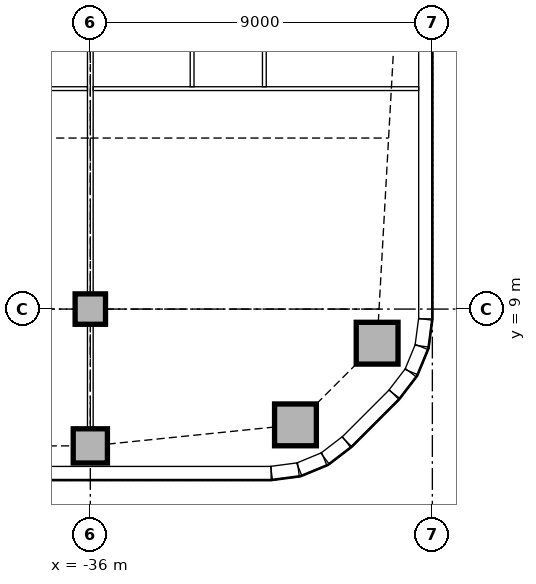
"""IFC4 building model, lengths in metres.
Left out: names, types, materials, properties, quantities, classifications, styles, units other than length and angle.
Written with IfcOpenShell. Run it as: python <this file> out.ifc"""

import sys

from ifc_helpers import new_model, si_unit, direction, frame, frame_2d, origin, origin_2d, place, context, subcontext, project, spatial, rectangle, extrude, element, fill, save


model = new_model("IFC4")
c1 = context("Model", 3, precision=1e-05, world=origin(), true_north=direction((0.0, 1.0)))
c2 = subcontext(c1, "Body", "Model", "MODEL_VIEW")
j1 = project(units=[si_unit("LENGTHUNIT", "METRE"), si_unit("PLANEANGLEUNIT", "RADIAN")], contexts=[c1])
p1 = place(None, origin())
s1 = spatial("IfcSite", under=j1, at=p1, CompositionType="ELEMENT")
p2 = place(p1, origin())
s2 = spatial("IfcBuilding", under=s1, at=p2, CompositionType="ELEMENT")
p3 = place(p2, frame((0.0, 0.0, 26.0)))
s3 = spatial("IfcBuildingStorey", under=s2, at=p3, CompositionType="ELEMENT", Elevation=26.0)
for number, where, z_axis, x_axis in (
    (1, (-30.602, 5.953, 0.0), (0.0, 0.0, 1.0), (1.0, 0.0, 0.0)),
    (2, (-28.453, 8.102, 0.0), (0.0, 0.0, 1.0), (1.0, 0.0, 0.0)),
):
    element("IfcColumn", number, at=place(p3, frame(where, z_axis=z_axis, x_axis=x_axis)), inside=s3, PredefinedType="COLUMN", context=c2, shape_type="SweptSolid", body=[
        extrude(rectangle(XDim=1.1, YDim=1.1, at=origin_2d()), origin(), (0.0, 0.0, 1.0), 3.85),
    ])
p4 = place(p3, frame((-36.0, 5.4, 0.0), z_axis=(0.0, 0.0, 1.0), x_axis=(1.0, 0.0, 0.0)))
e3 = element("IfcColumn", 3, at=p4, inside=s3, PredefinedType="COLUMN", context=c2, shape_type="SweptSolid", body=[
    extrude(rectangle(XDim=0.9, YDim=0.9, at=origin_2d()), origin(), (0.0, 0.0, 1.0), 3.85),
])
p5 = place(p3, frame((-36.0, 9.0, 0.0), z_axis=(0.0, 0.0, 1.0), x_axis=(1.0, 0.0, 0.0)))
e4 = element("IfcColumn", 4, at=p5, inside=s3, PredefinedType="COLUMN", context=c2, shape_type="SweptSolid", body=[
    extrude(rectangle(XDim=0.8, YDim=0.8, at=origin_2d()), origin(), (0.0, 0.0, 1.0), 3.85),
])
p6 = place(p3, frame((-61.757, 4.68, 0.0), z_axis=(0.0, 0.0, 1.0), x_axis=(1.0, 0.0, 0.0)))
e5 = element("IfcWall", 5, at=p6, inside=s3, PredefinedType="STANDARD", context=c2, shape_type="SweptSolid", body=[
    extrude(rectangle(XDim=30.515, YDim=0.36, at=frame_2d((15.257, 0.0))), origin(), (0.0, 0.0, 1.0), 3.85),
])
p7 = place(p6, frame((2.357, 0.0, 0.9)))
e6 = element("IfcOpeningElement", 6, at=p7, cuts=e5, PredefinedType="OPENING", context=c2, shape_type="SweptSolid", body=[
    extrude(rectangle(XDim=3.3, YDim=1.6, at=frame_2d((1.65, 0.8))), frame((0.0, 0.19, 0.0), z_axis=(0.0, -1.0, 0.0), x_axis=(1.0, 0.0, 0.0)), (0.0, 0.0, 1.0), 0.38),
])
p8 = place(p6, frame((6.857, 0.0, 0.9)))
e7 = element("IfcOpeningElement", 7, at=p8, cuts=e5, PredefinedType="OPENING", context=c2, shape_type="SweptSolid", body=[
    extrude(rectangle(XDim=3.3, YDim=1.6, at=frame_2d((1.65, 0.8))), frame((0.0, 0.19, 0.0), z_axis=(0.0, -1.0, 0.0), x_axis=(1.0, 0.0, 0.0)), (0.0, 0.0, 1.0), 0.38),
])
p9 = place(p6, frame((11.357, 0.0, 0.9)))
e8 = element("IfcOpeningElement", 8, at=p9, cuts=e5, PredefinedType="OPENING", context=c2, shape_type="SweptSolid", body=[
    extrude(rectangle(XDim=3.3, YDim=1.6, at=frame_2d((1.65, 0.8))), frame((0.0, 0.19, 0.0), z_axis=(0.0, -1.0, 0.0), x_axis=(1.0, 0.0, 0.0)), (0.0, 0.0, 1.0), 0.38),
])
p10 = place(p6, frame((15.857, 0.0, 0.9)))
e9 = element("IfcOpeningElement", 9, at=p10, cuts=e5, PredefinedType="OPENING", context=c2, shape_type="SweptSolid", body=[
    extrude(rectangle(XDim=3.3, YDim=1.6, at=frame_2d((1.65, 0.8))), frame((0.0, 0.19, 0.0), z_axis=(0.0, -1.0, 0.0), x_axis=(1.0, 0.0, 0.0)), (0.0, 0.0, 1.0), 0.38),
])
p11 = place(p6, frame((20.357, 0.0, 0.9)))
e10 = element("IfcOpeningElement", 10, at=p11, cuts=e5, PredefinedType="OPENING", context=c2, shape_type="SweptSolid", body=[
    extrude(rectangle(XDim=3.3, YDim=1.6, at=frame_2d((1.65, 0.8))), frame((0.0, 0.19, 0.0), z_axis=(0.0, -1.0, 0.0), x_axis=(1.0, 0.0, 0.0)), (0.0, 0.0, 1.0), 0.38),
])
p12 = place(p6, frame((24.857, 0.0, 0.9)))
e11 = element("IfcOpeningElement", 11, at=p12, cuts=e5, PredefinedType="OPENING", context=c2, shape_type="SweptSolid", body=[
    extrude(rectangle(XDim=3.3, YDim=1.6, at=frame_2d((1.65, 0.8))), frame((0.0, 0.19, 0.0), z_axis=(0.0, -1.0, 0.0), x_axis=(1.0, 0.0, 0.0)), (0.0, 0.0, 1.0), 0.38),
])
p13 = place(p3, frame((-29.249, 5.506, 0.0), z_axis=(0.0, 0.0, 1.0), x_axis=(0.707106781187, 0.707106781187, 0.0)))
e12 = element("IfcWall", 12, at=p13, inside=s3, PredefinedType="STANDARD", context=c2, shape_type="SweptSolid", body=[
    extrude(rectangle(XDim=1.757, YDim=0.36, at=frame_2d((0.879, 0.0))), origin(), (0.0, 0.0, 1.0), 3.85),
])
p14 = place(p3, frame((-27.18, 8.743, 0.0), z_axis=(0.0, 0.0, 1.0), x_axis=(0.0, 1.0, 0.0)))
e13 = element("IfcWall", 13, at=p14, inside=s3, PredefinedType="STANDARD", context=c2, shape_type="SweptSolid", body=[
    extrude(rectangle(XDim=12.257, YDim=0.36, at=frame_2d((6.129, 0.0))), origin(), (0.0, 0.0, 1.0), 3.85),
])
p15 = place(p14, frame((2.607, 0.0, 0.9)))
e14 = element("IfcOpeningElement", 14, at=p15, cuts=e13, PredefinedType="OPENING", context=c2, shape_type="SweptSolid", body=[
    extrude(rectangle(XDim=3.3, YDim=1.6, at=frame_2d((1.65, 0.8))), frame((0.0, 0.19, 0.0), z_axis=(0.0, -1.0, 0.0), x_axis=(1.0, 0.0, 0.0)), (0.0, 0.0, 1.0), 0.38),
])
p16 = place(p14, frame((7.607, 0.0, 0.9)))
e15 = element("IfcOpeningElement", 15, at=p16, cuts=e13, PredefinedType="OPENING", context=c2, shape_type="SweptSolid", body=[
    extrude(rectangle(XDim=3.3, YDim=1.6, at=frame_2d((1.65, 0.8))), frame((0.0, 0.19, 0.0), z_axis=(0.0, -1.0, 0.0), x_axis=(1.0, 0.0, 0.0)), (0.0, 0.0, 1.0), 0.38),
])
for number, where, z_axis, x_axis in (
    (16, (-31.231, 4.683, 0.0), (0.0, 0.0, 1.0), (0.991, 0.131, 0.0)),
    (17, (-30.503, 4.782, 0.0), (0.0, 0.0, 1.0), (0.924, 0.383, 0.0)),
):
    element("IfcWall", number, at=place(p3, frame(where, z_axis=z_axis, x_axis=x_axis)), inside=s3, PredefinedType="STANDARD", context=c2, shape_type="SweptSolid", body=[
        extrude(rectangle(XDim=0.713, YDim=0.36, at=frame_2d((0.356, 0.0))), origin(), (0.0, 0.0, 1.0), 3.85),
    ])
for number, where, z_axis, x_axis in (
    (18, (-29.825, 5.066, 0.0), (0.0, 0.0, 1.0), (0.793, 0.609, 0.0)),
    (19, (-28.0, 6.759, 0.0), (0.0, 0.0, 1.0), (0.609, 0.793, 0.0)),
):
    element("IfcWall", number, at=place(p3, frame(where, z_axis=z_axis, x_axis=x_axis)), inside=s3, PredefinedType="STANDARD", context=c2, shape_type="SweptSolid", body=[
        extrude(rectangle(XDim=0.713, YDim=0.36, at=frame_2d((0.357, 0.0))), origin(), (0.0, 0.0, 1.0), 3.85),
    ])
for number, where, z_axis, x_axis in (
    (20, (-27.555, 7.344, 0.0), (0.0, 0.0, 1.0), (0.383, 0.924, 0.0)),
    (21, (-27.276, 8.024, 0.0), (0.0, 0.0, 1.0), (0.131, 0.991, 0.0)),
):
    element("IfcWall", number, at=place(p3, frame(where, z_axis=z_axis, x_axis=x_axis)), inside=s3, PredefinedType="STANDARD", context=c2, shape_type="SweptSolid", body=[
        extrude(rectangle(XDim=0.713, YDim=0.36, at=frame_2d((0.356, 0.0))), origin(), (0.0, 0.0, 1.0), 3.85),
    ])
p17 = place(p3, frame((-36.0, 9.4, 0.0), z_axis=(0.0, 0.0, 1.0), x_axis=(0.0, 1.0, 0.0)))
e22 = element("IfcWall", 22, at=p17, inside=s3, PredefinedType="PARTITIONING", context=c2, shape_type="SweptSolid", body=[
    extrude(rectangle(XDim=8.2, YDim=0.15, at=frame_2d((4.1, 0.0))), origin(), (0.0, 0.0, 1.0), 3.158),
])
p18 = place(p3, frame((-36.0, 5.85, 0.0), z_axis=(0.0, 0.0, 1.0), x_axis=(0.0, 1.0, 0.0)))
e23 = element("IfcWall", 23, at=p18, inside=s3, PredefinedType="PARTITIONING", context=c2, shape_type="SweptSolid", body=[
    extrude(rectangle(XDim=2.75, YDim=0.15, at=frame_2d((1.375, 0.0))), origin(), (0.0, 0.0, 1.0), 3.652),
])
p19 = place(p3, frame((-44.925, 14.8, 0.0), z_axis=(0.0, 0.0, 1.0), x_axis=(1.0, 0.0, 0.0)))
e24 = element("IfcWall", 24, at=p19, inside=s3, PredefinedType="PARTITIONING", context=c2, shape_type="SweptSolid", body=[
    extrude(rectangle(XDim=8.85, YDim=0.1, at=frame_2d((4.425, 0.0))), origin(), (0.0, 0.0, 1.0), 3.85),
])
p20 = place(p19, frame((3.265, 0.0, 0.0)))
e25 = element("IfcOpeningElement", 25, at=p20, cuts=e24, PredefinedType="OPENING", context=c2, shape_type="SweptSolid", body=[
    extrude(rectangle(XDim=0.9, YDim=2.1, at=frame_2d((0.45, 1.05))), frame((0.0, 0.06, 0.0), z_axis=(0.0, -1.0, 0.0), x_axis=(1.0, 0.0, 0.0)), (0.0, 0.0, 1.0), 0.12),
])
p21 = place(p3, frame((-35.925, 14.8, 0.0), z_axis=(0.0, 0.0, 1.0), x_axis=(1.0, 0.0, 0.0)))
e26 = element("IfcWall", 26, at=p21, inside=s3, PredefinedType="PARTITIONING", context=c2, shape_type="SweptSolid", body=[
    extrude(rectangle(XDim=8.565, YDim=0.1, at=frame_2d((4.282, 0.0))), origin(), (0.0, 0.0, 1.0), 3.85),
])
p22 = place(p21, frame((3.103, 0.0, 0.0)))
e27 = element("IfcOpeningElement", 27, at=p22, cuts=e26, PredefinedType="OPENING", context=c2, shape_type="SweptSolid", body=[
    extrude(rectangle(XDim=0.9, YDim=2.1, at=frame_2d((0.45, 1.05))), frame((0.0, 0.06, 0.0), z_axis=(0.0, -1.0, 0.0), x_axis=(1.0, 0.0, 0.0)), (0.0, 0.0, 1.0), 0.12),
])
p23 = place(p3, frame((-33.322, 14.85, 0.0), z_axis=(0.0, 0.0, 1.0), x_axis=(0.0, 1.0, 0.0)))
e28 = element("IfcWall", 28, at=p23, inside=s3, PredefinedType="PARTITIONING", context=c2, shape_type="SweptSolid", body=[
    extrude(rectangle(XDim=3.075, YDim=0.1, at=frame_2d((1.538, 0.0))), origin(), (0.0, 0.0, 1.0), 3.85),
])
p24 = place(p23, frame((1.1, 0.0, 0.0)))
e29 = element("IfcOpeningElement", 29, at=p24, cuts=e28, PredefinedType="OPENING", context=c2, shape_type="SweptSolid", body=[
    extrude(rectangle(XDim=0.9, YDim=2.1, at=frame_2d((0.45, 1.05))), frame((0.0, 0.06, 0.0), z_axis=(0.0, -1.0, 0.0), x_axis=(1.0, 0.0, 0.0)), (0.0, 0.0, 1.0), 0.12),
])
p25 = place(p3, frame((-31.421, 14.85, 0.0), z_axis=(0.0, 0.0, 1.0), x_axis=(0.0, 1.0, 0.0)))
e30 = element("IfcWall", 30, at=p25, inside=s3, PredefinedType="PARTITIONING", context=c2, shape_type="SweptSolid", body=[
    extrude(rectangle(XDim=3.075, YDim=0.1, at=frame_2d((1.538, 0.0))), origin(), (0.0, 0.0, 1.0), 3.85),
])
p26 = place(p25, frame((1.1, 0.0, 0.0)))
e31 = element("IfcOpeningElement", 31, at=p26, cuts=e30, PredefinedType="OPENING", context=c2, shape_type="SweptSolid", body=[
    extrude(rectangle(XDim=0.9, YDim=2.1, at=frame_2d((0.45, 1.05))), frame((0.0, 0.06, 0.0), z_axis=(0.0, -1.0, 0.0), x_axis=(1.0, 0.0, 0.0)), (0.0, 0.0, 1.0), 0.12),
])
p27 = place(p12, origin())
e32 = element("IfcWindow", 32, at=p27, inside=s3, PartitioningType="SINGLE_PANEL", PredefinedType="WINDOW", context=c2, shape_type="SweptSolid", body=[
    extrude(rectangle(XDim=3.3, YDim=1.6, at=frame_2d((1.65, 0.8))), frame((0.0, 0.13, 0.0), z_axis=(0.0, -1.0, 0.0), x_axis=(1.0, 0.0, 0.0)), (0.0, 0.0, 1.0), 0.06),
])
fill(e11, e32)
p28 = place(p15, origin())
e33 = element("IfcWindow", 33, at=p28, inside=s3, PartitioningType="SINGLE_PANEL", PredefinedType="WINDOW", context=c2, shape_type="SweptSolid", body=[
    extrude(rectangle(XDim=3.3, YDim=1.6, at=frame_2d((1.65, 0.8))), frame((0.0, 0.13, 0.0), z_axis=(0.0, -1.0, 0.0), x_axis=(1.0, 0.0, 0.0)), (0.0, 0.0, 1.0), 0.06),
])
fill(e14, e33)
p29 = place(p22, origin())
e34 = element("IfcDoor", 34, at=p29, inside=s3, OperationType="SINGLE_SWING_RIGHT", PredefinedType="DOOR", context=c2, shape_type="SweptSolid", body=[
    extrude(rectangle(XDim=0.9, YDim=2.1, at=frame_2d((0.45, 1.05))), frame((0.0, 0.025, 0.0), z_axis=(0.0, -1.0, 0.0), x_axis=(1.0, 0.0, 0.0)), (0.0, 0.0, 1.0), 0.05),
])
fill(e27, e34)
save(model, sys.argv[1])
